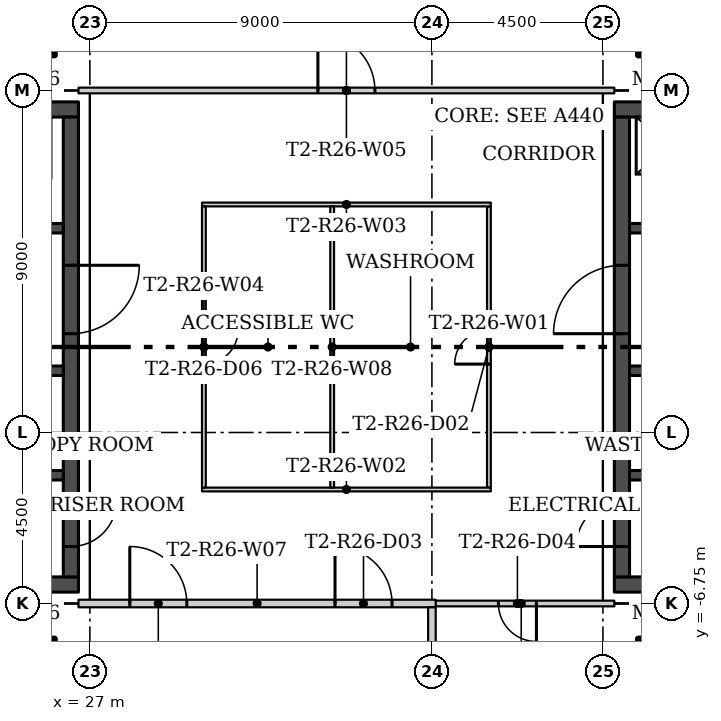
"""IFC4 building model, lengths in metres.
Left out: names, types, materials, properties, quantities, classifications, styles, units other than length and angle.
Written with IfcOpenShell. Run it as: python <this file> out.ifc"""

import sys

from ifc_helpers import new_model, si_unit, direction, frame, frame_2d, origin, origin_2d, place, context, subcontext, project, spatial, rectangle, hollow_rectangle, extrude, element, fill, save


model = new_model("IFC4")
c1 = context("Model", 3, precision=1e-05, world=origin(), true_north=direction((0.0, 1.0)))
c2 = subcontext(c1, "Body", "Model", "MODEL_VIEW")
j1 = project(units=[si_unit("LENGTHUNIT", "METRE"), si_unit("PLANEANGLEUNIT", "RADIAN")], contexts=[c1])
p1 = place(None, origin())
s1 = spatial("IfcSite", under=j1, at=p1, CompositionType="ELEMENT")
p2 = place(p1, origin())
s2 = spatial("IfcBuilding", under=s1, at=p2, CompositionType="ELEMENT")
p3 = place(p2, frame((0.0, 0.0, 242.1)))
s3 = spatial("IfcBuildingStorey", under=s2, at=p3, CompositionType="ELEMENT", Elevation=242.1)
for number, where in (
    (1, (25.625, 8.125, 0.0)),
    (2, (41.875, 8.125, 0.0)),
    (3, (25.625, -8.125, 0.0)),
    (4, (41.875, -8.125, 0.0)),
):
    element("IfcColumn", number, at=place(p3, frame(where)), inside=s3, PredefinedType="COLUMN", context=c2, shape_type="SweptSolid", body=[
        extrude(hollow_rectangle(XDim=0.9, YDim=0.9, WallThickness=0.036, at=origin_2d()), origin(), (0.0, 0.0, 1.0), 3.55),
    ])
p4 = place(p3, frame((37.5, -3.7, 0.0), z_axis=(0.0, 0.0, 1.0), x_axis=(0.0, 1.0, 0.0)))
e5 = element("IfcWall", 5, at=p4, inside=s3, PredefinedType="PARTITIONING", context=c2, shape_type="SweptSolid", body=[
    extrude(rectangle(XDim=7.4, YDim=0.1, at=frame_2d((3.7, 0.0))), origin(), (0.0, 0.0, 1.0), 3.55),
])
p5 = place(p4, frame((3.25, 0.0, 0.0)))
e6 = element("IfcOpeningElement", 6, at=p5, cuts=e5, PredefinedType="OPENING", context=c2, shape_type="SweptSolid", body=[
    extrude(rectangle(XDim=0.9, YDim=2.1, at=frame_2d((0.45, 1.05))), frame((0.0, 0.06, 0.0), z_axis=(0.0, -1.0, 0.0), x_axis=(1.0, 0.0, 0.0)), (0.0, 0.0, 1.0), 0.12),
])
p6 = place(p3, frame((29.95, -3.75, 0.0)))
e7 = element("IfcWall", 7, at=p6, inside=s3, PredefinedType="PARTITIONING", context=c2, shape_type="SweptSolid", body=[
    extrude(rectangle(XDim=7.6, YDim=0.1, at=frame_2d((3.8, 0.0))), origin(), (0.0, 0.0, 1.0), 3.55),
])
p7 = place(p3, frame((37.55, 3.75, 0.0), z_axis=(0.0, 0.0, 1.0), x_axis=(-1.0, 0.0, 0.0)))
e8 = element("IfcWall", 8, at=p7, inside=s3, PredefinedType="PARTITIONING", context=c2, shape_type="SweptSolid", body=[
    extrude(rectangle(XDim=7.6, YDim=0.1, at=frame_2d((3.8, 0.0))), origin(), (0.0, 0.0, 1.0), 3.55),
])
p8 = place(p3, frame((30.0, 3.7, 0.0), z_axis=(0.0, 0.0, 1.0), x_axis=(0.0, -1.0, 0.0)))
e9 = element("IfcWall", 9, at=p8, inside=s3, PredefinedType="PARTITIONING", context=c2, shape_type="SweptSolid", body=[
    extrude(rectangle(XDim=7.4, YDim=0.1, at=frame_2d((3.7, 0.0))), origin(), (0.0, 0.0, 1.0), 3.55),
])
p9 = place(p8, frame((3.25, 0.0, 0.0)))
e10 = element("IfcOpeningElement", 10, at=p9, cuts=e9, PredefinedType="OPENING", context=c2, shape_type="SweptSolid", body=[
    extrude(rectangle(XDim=0.9, YDim=2.1, at=frame_2d((0.45, 1.05))), frame((0.0, 0.06, 0.0), z_axis=(0.0, -1.0, 0.0), x_axis=(1.0, 0.0, 0.0)), (0.0, 0.0, 1.0), 0.12),
])
p10 = place(p3, frame((26.7, 6.75, 0.0)))
e11 = element("IfcWall", 11, at=p10, inside=s3, PredefinedType="PARTITIONING", context=c2, shape_type="SweptSolid", body=[
    extrude(rectangle(XDim=14.1, YDim=0.15, at=frame_2d((7.05, 0.0))), origin(), (0.0, 0.0, 1.0), 3.55),
])
p11 = place(p10, frame((6.3, 0.0, 0.0)))
e12 = element("IfcOpeningElement", 12, at=p11, cuts=e11, PredefinedType="OPENING", context=c2, shape_type="SweptSolid", body=[
    extrude(rectangle(XDim=1.5, YDim=2.1, at=frame_2d((0.75, 1.05))), frame((0.0, 0.085, 0.0), z_axis=(0.0, -1.0, 0.0), x_axis=(1.0, 0.0, 0.0)), (0.0, 0.0, 1.0), 0.17),
])
p12 = place(p3, frame((40.8, -6.75, 0.0), z_axis=(0.0, 0.0, 1.0), x_axis=(-1.0, 0.0, 0.0)))
e13 = element("IfcWall", 13, at=p12, inside=s3, PredefinedType="PARTITIONING", context=c2, shape_type="SweptSolid", body=[
    extrude(rectangle(XDim=4.9, YDim=0.15, at=frame_2d((2.45, 0.0))), origin(), (0.0, 0.0, 1.0), 3.55),
])
p13 = place(p12, frame((2.05, 0.0, 0.0)))
e14 = element("IfcOpeningElement", 14, at=p13, cuts=e13, PredefinedType="OPENING", context=c2, shape_type="SweptSolid", body=[
    extrude(rectangle(XDim=1.0, YDim=2.4, at=frame_2d((0.5, 1.2))), frame((0.0, 0.085, 0.0), z_axis=(0.0, -1.0, 0.0), x_axis=(1.0, 0.0, 0.0)), (0.0, 0.0, 1.0), 0.17),
])
p14 = place(p3, frame((26.7, -6.75, 0.0)))
e15 = element("IfcWall", 15, at=p14, inside=s3, PredefinedType="PARTITIONING", context=c2, shape_type="SweptSolid", body=[
    extrude(rectangle(XDim=9.4, YDim=0.2, at=frame_2d((4.7, 0.0))), origin(), (0.0, 0.0, 1.0), 3.55),
])
p15 = place(p14, frame((6.75, 0.0, 0.0)))
e16 = element("IfcOpeningElement", 16, at=p15, cuts=e15, PredefinedType="OPENING", context=c2, shape_type="SweptSolid", body=[
    extrude(rectangle(XDim=1.5, YDim=2.4, at=frame_2d((0.75, 1.2))), frame((0.0, 0.11, 0.0), z_axis=(0.0, -1.0, 0.0), x_axis=(1.0, 0.0, 0.0)), (0.0, 0.0, 1.0), 0.22),
])
p16 = place(p14, frame((1.35, 0.0, 0.0)))
e17 = element("IfcOpeningElement", 17, at=p16, cuts=e15, PredefinedType="OPENING", context=c2, shape_type="SweptSolid", body=[
    extrude(rectangle(XDim=1.5, YDim=2.4, at=frame_2d((0.75, 1.2))), frame((0.0, 0.11, 0.0), z_axis=(0.0, -1.0, 0.0), x_axis=(1.0, 0.0, 0.0)), (0.0, 0.0, 1.0), 0.22),
])
p17 = place(p3, frame((33.375, 3.7, 0.0), z_axis=(0.0, 0.0, 1.0), x_axis=(0.0, -1.0, 0.0)))
e18 = element("IfcWall", 18, at=p17, inside=s3, PredefinedType="PARTITIONING", context=c2, shape_type="SweptSolid", body=[
    extrude(rectangle(XDim=7.4, YDim=0.1, at=frame_2d((3.7, 0.0))), origin(), (0.0, 0.0, 1.0), 3.55),
])
p18 = place(p3, frame((36.0, -6.85, 0.0), z_axis=(0.0, 0.0, 1.0), x_axis=(0.0, -1.0, 0.0)))
e19 = element("IfcWall", 19, at=p18, inside=s3, PredefinedType="PARTITIONING", context=c2, shape_type="SweptSolid", body=[
    extrude(rectangle(XDim=8.805, YDim=0.2, at=frame_2d((4.402, 0.0))), origin(), (0.0, 0.0, 1.0), 3.55),
])
for number, where in (
    (20, (13.8, -6.25, 0.0)),
    (21, (13.8, 6.25, 0.0)),
):
    element("IfcWall", number, at=place(p3, frame(where)), inside=s3, PredefinedType="SHEAR", context=c2, shape_type="SweptSolid", body=[
        extrude(rectangle(XDim=12.9, YDim=0.4, at=frame_2d((6.45, 0.0))), origin(), (0.0, 0.0, 1.0), 3.55),
    ])
p19 = place(p3, frame((26.5, 6.05, 0.0), z_axis=(0.0, 0.0, 1.0), x_axis=(0.0, -1.0, 0.0)))
e22 = element("IfcWall", 22, at=p19, inside=s3, PredefinedType="SHEAR", context=c2, shape_type="SweptSolid", body=[
    extrude(rectangle(XDim=12.1, YDim=0.4, at=frame_2d((6.05, 0.0))), origin(), (0.0, 0.0, 1.0), 3.55),
])
p20 = place(p19, frame((10.1, 0.0, 0.0)))
e23 = element("IfcOpeningElement", 23, at=p20, cuts=e22, PredefinedType="OPENING", context=c2, shape_type="SweptSolid", body=[
    extrude(rectangle(XDim=1.2, YDim=2.1, at=frame_2d((0.6, 1.05))), frame((0.0, 0.21, 0.0), z_axis=(0.0, -1.0, 0.0), x_axis=(1.0, 0.0, 0.0)), (0.0, 0.0, 1.0), 0.42),
])
p21 = place(p19, frame((3.9, 0.0, 0.0)))
e24 = element("IfcOpeningElement", 24, at=p21, cuts=e22, PredefinedType="OPENING", context=c2, shape_type="SweptSolid", body=[
    extrude(rectangle(XDim=1.8, YDim=2.4, at=frame_2d((0.9, 1.2))), frame((0.0, 0.21, 0.0), z_axis=(0.0, -1.0, 0.0), x_axis=(1.0, 0.0, 0.0)), (0.0, 0.0, 1.0), 0.42),
])
p22 = place(p3, frame((26.3, -3.375, 0.0), z_axis=(0.0, 0.0, 1.0), x_axis=(-1.0, 0.0, 0.0)))
e25 = element("IfcWall", 25, at=p22, inside=s3, PredefinedType="SHEAR", context=c2, shape_type="SweptSolid", body=[
    extrude(rectangle(XDim=12.1, YDim=0.25, at=frame_2d((6.05, 0.0))), origin(), (0.0, 0.0, 1.0), 3.55),
])
p23 = place(p22, frame((10.95, 0.0, 0.0)))
e26 = element("IfcOpeningElement", 26, at=p23, cuts=e25, PredefinedType="OPENING", context=c2, shape_type="SweptSolid", body=[
    extrude(rectangle(XDim=1.1, YDim=2.1, at=frame_2d((0.55, 1.05))), frame((0.0, 0.135, 0.0), z_axis=(0.0, -1.0, 0.0), x_axis=(1.0, 0.0, 0.0)), (0.0, 0.0, 1.0), 0.27),
])
p24 = place(p3, frame((26.3, -0.625, 0.0), z_axis=(0.0, 0.0, 1.0), x_axis=(-1.0, 0.0, 0.0)))
e27 = element("IfcWall", 27, at=p24, inside=s3, PredefinedType="SHEAR", context=c2, shape_type="SweptSolid", body=[
    extrude(rectangle(XDim=12.1, YDim=0.25, at=frame_2d((6.05, 0.0))), origin(), (0.0, 0.0, 1.0), 3.55),
])
p25 = place(p24, frame((8.65, 0.0, 0.0)))
e28 = element("IfcOpeningElement", 28, at=p25, cuts=e27, PredefinedType="OPENING", context=c2, shape_type="SweptSolid", body=[
    extrude(rectangle(XDim=1.2, YDim=2.1, at=frame_2d((0.6, 1.05))), frame((0.0, 0.135, 0.0), z_axis=(0.0, -1.0, 0.0), x_axis=(1.0, 0.0, 0.0)), (0.0, 0.0, 1.0), 0.27),
])
p26 = place(p24, frame((2.15, 0.0, 0.0)))
e29 = element("IfcOpeningElement", 29, at=p26, cuts=e27, PredefinedType="OPENING", context=c2, shape_type="SweptSolid", body=[
    extrude(rectangle(XDim=0.9, YDim=2.1, at=frame_2d((0.45, 1.05))), frame((0.0, 0.135, 0.0), z_axis=(0.0, -1.0, 0.0), x_axis=(1.0, 0.0, 0.0)), (0.0, 0.0, 1.0), 0.27),
])
p27 = place(p24, frame((0.525, 0.0, 0.0)))
e30 = element("IfcOpeningElement", 30, at=p27, cuts=e27, PredefinedType="OPENING", context=c2, shape_type="SweptSolid", body=[
    extrude(rectangle(XDim=0.9, YDim=2.1, at=frame_2d((0.45, 1.05))), frame((0.0, 0.135, 0.0), z_axis=(0.0, -1.0, 0.0), x_axis=(1.0, 0.0, 0.0)), (0.0, 0.0, 1.0), 0.27),
])
p28 = place(p3, frame((14.2, 3.125, 0.0)))
e31 = element("IfcWall", 31, at=p28, inside=s3, PredefinedType="SHEAR", context=c2, shape_type="SweptSolid", body=[
    extrude(rectangle(XDim=12.1, YDim=0.25, at=frame_2d((6.05, 0.0))), origin(), (0.0, 0.0, 1.0), 3.55),
])
p29 = place(p28, frame((6.95, 0.0, 0.0)))
e32 = element("IfcOpeningElement", 32, at=p29, cuts=e31, PredefinedType="OPENING", context=c2, shape_type="SweptSolid", body=[
    extrude(rectangle(XDim=1.1, YDim=2.1, at=frame_2d((0.55, 1.05))), frame((0.0, 0.135, 0.0), z_axis=(0.0, -1.0, 0.0), x_axis=(1.0, 0.0, 0.0)), (0.0, 0.0, 1.0), 0.27),
])
p30 = place(p28, frame((10.075, 0.0, 0.0)))
e33 = element("IfcOpeningElement", 33, at=p30, cuts=e31, PredefinedType="OPENING", context=c2, shape_type="SweptSolid", body=[
    extrude(rectangle(XDim=1.1, YDim=2.1, at=frame_2d((0.55, 1.05))), frame((0.0, 0.135, 0.0), z_axis=(0.0, -1.0, 0.0), x_axis=(1.0, 0.0, 0.0)), (0.0, 0.0, 1.0), 0.27),
])
p31 = place(p28, frame((1.65, 0.0, 0.0)))
e34 = element("IfcOpeningElement", 34, at=p31, cuts=e31, PredefinedType="OPENING", context=c2, shape_type="SweptSolid", body=[
    extrude(rectangle(XDim=0.9, YDim=2.1, at=frame_2d((0.45, 1.05))), frame((0.0, 0.135, 0.0), z_axis=(0.0, -1.0, 0.0), x_axis=(1.0, 0.0, 0.0)), (0.0, 0.0, 1.0), 0.27),
])
p32 = place(p28, frame((4.575, 0.0, 0.0)))
e35 = element("IfcOpeningElement", 35, at=p32, cuts=e31, PredefinedType="OPENING", context=c2, shape_type="SweptSolid", body=[
    extrude(rectangle(XDim=0.9, YDim=2.1, at=frame_2d((0.45, 1.05))), frame((0.0, 0.135, 0.0), z_axis=(0.0, -1.0, 0.0), x_axis=(1.0, 0.0, 0.0)), (0.0, 0.0, 1.0), 0.27),
])
for number, where, z_axis, x_axis in (
    (36, (53.7, -6.25, 0.0), (0.0, 0.0, 1.0), (-1.0, 0.0, 0.0)),
    (37, (53.7, 6.25, 0.0), (0.0, 0.0, 1.0), (-1.0, 0.0, 0.0)),
):
    element("IfcWall", number, at=place(p3, frame(where, z_axis=z_axis, x_axis=x_axis)), inside=s3, PredefinedType="SHEAR", context=c2, shape_type="SweptSolid", body=[
        extrude(rectangle(XDim=12.9, YDim=0.4, at=frame_2d((6.45, 0.0))), origin(), (0.0, 0.0, 1.0), 3.55),
    ])
p33 = place(p3, frame((41.0, -6.05, 0.0), z_axis=(0.0, 0.0, 1.0), x_axis=(0.0, 1.0, 0.0)))
e38 = element("IfcWall", 38, at=p33, inside=s3, PredefinedType="SHEAR", context=c2, shape_type="SweptSolid", body=[
    extrude(rectangle(XDim=12.1, YDim=0.4, at=frame_2d((6.05, 0.0))), origin(), (0.0, 0.0, 1.0), 3.55),
])
p34 = place(p33, frame((0.8, 0.0, 0.0)))
e39 = element("IfcOpeningElement", 39, at=p34, cuts=e38, PredefinedType="OPENING", context=c2, shape_type="SweptSolid", body=[
    extrude(rectangle(XDim=1.2, YDim=2.1, at=frame_2d((0.6, 1.05))), frame((0.0, 0.21, 0.0), z_axis=(0.0, -1.0, 0.0), x_axis=(1.0, 0.0, 0.0)), (0.0, 0.0, 1.0), 0.42),
])
p35 = place(p33, frame((6.4, 0.0, 0.0)))
e40 = element("IfcOpeningElement", 40, at=p35, cuts=e38, PredefinedType="OPENING", context=c2, shape_type="SweptSolid", body=[
    extrude(rectangle(XDim=1.8, YDim=2.4, at=frame_2d((0.9, 1.2))), frame((0.0, 0.21, 0.0), z_axis=(0.0, -1.0, 0.0), x_axis=(1.0, 0.0, 0.0)), (0.0, 0.0, 1.0), 0.42),
])
p36 = place(p3, frame((53.3, -3.375, 0.0), z_axis=(0.0, 0.0, 1.0), x_axis=(-1.0, 0.0, 0.0)))
e41 = element("IfcWall", 41, at=p36, inside=s3, PredefinedType="SHEAR", context=c2, shape_type="SweptSolid", body=[
    extrude(rectangle(XDim=12.1, YDim=0.25, at=frame_2d((6.05, 0.0))), origin(), (0.0, 0.0, 1.0), 3.55),
])
p37 = place(p36, frame((0.05, 0.0, 0.0)))
e42 = element("IfcOpeningElement", 42, at=p37, cuts=e41, PredefinedType="OPENING", context=c2, shape_type="SweptSolid", body=[
    extrude(rectangle(XDim=1.1, YDim=2.1, at=frame_2d((0.55, 1.05))), frame((0.0, 0.135, 0.0), z_axis=(0.0, -1.0, 0.0), x_axis=(1.0, 0.0, 0.0)), (0.0, 0.0, 1.0), 0.27),
])
p38 = place(p3, frame((53.3, -0.625, 0.0), z_axis=(0.0, 0.0, 1.0), x_axis=(-1.0, 0.0, 0.0)))
e43 = element("IfcWall", 43, at=p38, inside=s3, PredefinedType="SHEAR", context=c2, shape_type="SweptSolid", body=[
    extrude(rectangle(XDim=12.1, YDim=0.25, at=frame_2d((6.05, 0.0))), origin(), (0.0, 0.0, 1.0), 3.55),
])
p39 = place(p38, frame((2.25, 0.0, 0.0)))
e44 = element("IfcOpeningElement", 44, at=p39, cuts=e43, PredefinedType="OPENING", context=c2, shape_type="SweptSolid", body=[
    extrude(rectangle(XDim=1.2, YDim=2.1, at=frame_2d((0.6, 1.05))), frame((0.0, 0.135, 0.0), z_axis=(0.0, -1.0, 0.0), x_axis=(1.0, 0.0, 0.0)), (0.0, 0.0, 1.0), 0.27),
])
p40 = place(p38, frame((9.2, 0.0, 0.0)))
e45 = element("IfcOpeningElement", 45, at=p40, cuts=e43, PredefinedType="OPENING", context=c2, shape_type="SweptSolid", body=[
    extrude(rectangle(XDim=0.9, YDim=2.1, at=frame_2d((0.45, 1.05))), frame((0.0, 0.135, 0.0), z_axis=(0.0, -1.0, 0.0), x_axis=(1.0, 0.0, 0.0)), (0.0, 0.0, 1.0), 0.27),
])
p41 = place(p38, frame((10.825, 0.0, 0.0)))
e46 = element("IfcOpeningElement", 46, at=p41, cuts=e43, PredefinedType="OPENING", context=c2, shape_type="SweptSolid", body=[
    extrude(rectangle(XDim=0.9, YDim=2.1, at=frame_2d((0.45, 1.05))), frame((0.0, 0.135, 0.0), z_axis=(0.0, -1.0, 0.0), x_axis=(1.0, 0.0, 0.0)), (0.0, 0.0, 1.0), 0.27),
])
p42 = place(p3, frame((41.2, 3.125, 0.0)))
e47 = element("IfcWall", 47, at=p42, inside=s3, PredefinedType="SHEAR", context=c2, shape_type="SweptSolid", body=[
    extrude(rectangle(XDim=4.8, YDim=0.25, at=frame_2d((2.4, 0.0))), origin(), (0.0, 0.0, 1.0), 3.55),
])
p43 = place(p42, frame((0.525, 0.0, 0.0)))
e48 = element("IfcOpeningElement", 48, at=p43, cuts=e47, PredefinedType="OPENING", context=c2, shape_type="SweptSolid", body=[
    extrude(rectangle(XDim=1.1, YDim=2.1, at=frame_2d((0.55, 1.05))), frame((0.0, 0.135, 0.0), z_axis=(0.0, -1.0, 0.0), x_axis=(1.0, 0.0, 0.0)), (0.0, 0.0, 1.0), 0.27),
])
p44 = place(p42, frame((3.025, 0.0, 0.0)))
e49 = element("IfcOpeningElement", 49, at=p44, cuts=e47, PredefinedType="OPENING", context=c2, shape_type="SweptSolid", body=[
    extrude(rectangle(XDim=0.9, YDim=2.1, at=frame_2d((0.45, 1.05))), frame((0.0, 0.135, 0.0), z_axis=(0.0, -1.0, 0.0), x_axis=(1.0, 0.0, 0.0)), (0.0, 0.0, 1.0), 0.27),
])
p45 = place(p11, origin())
e50 = element("IfcDoor", 50, at=p45, inside=s3, OperationType="DOUBLE_DOOR_SINGLE_SWING", PredefinedType="DOOR", context=c2, shape_type="SweptSolid", body=[
    extrude(rectangle(XDim=1.5, YDim=2.1, at=frame_2d((0.75, 1.05))), frame((0.0, 0.025, 0.0), z_axis=(0.0, -1.0, 0.0), x_axis=(1.0, 0.0, 0.0)), (0.0, 0.0, 1.0), 0.05),
])
fill(e12, e50)
p46 = place(p5, origin())
e51 = element("IfcDoor", 51, at=p46, inside=s3, OperationType="SINGLE_SWING_LEFT", PredefinedType="DOOR", context=c2, shape_type="SweptSolid", body=[
    extrude(rectangle(XDim=0.9, YDim=2.1, at=frame_2d((0.45, 1.05))), frame((0.0, 0.025, 0.0), z_axis=(0.0, -1.0, 0.0), x_axis=(1.0, 0.0, 0.0)), (0.0, 0.0, 1.0), 0.05),
])
fill(e6, e51)
p47 = place(p15, origin())
e52 = element("IfcDoor", 52, at=p47, inside=s3, OperationType="DOUBLE_DOOR_SINGLE_SWING", PredefinedType="DOOR", context=c2, shape_type="SweptSolid", body=[
    extrude(rectangle(XDim=1.5, YDim=2.4, at=frame_2d((0.75, 1.2))), frame((0.0, 0.025, 0.0), z_axis=(0.0, -1.0, 0.0), x_axis=(1.0, 0.0, 0.0)), (0.0, 0.0, 1.0), 0.05),
])
fill(e16, e52)
p48 = place(p13, origin())
e53 = element("IfcDoor", 53, at=p48, inside=s3, OperationType="SINGLE_SWING_RIGHT", PredefinedType="DOOR", context=c2, shape_type="SweptSolid", body=[
    extrude(rectangle(XDim=1.0, YDim=2.4, at=frame_2d((0.5, 1.2))), frame((0.0, 0.025, 0.0), z_axis=(0.0, -1.0, 0.0), x_axis=(1.0, 0.0, 0.0)), (0.0, 0.0, 1.0), 0.05),
])
fill(e14, e53)
p49 = place(p16, origin())
e54 = element("IfcDoor", 54, at=p49, inside=s3, OperationType="DOUBLE_DOOR_SINGLE_SWING", PredefinedType="DOOR", context=c2, shape_type="SweptSolid", body=[
    extrude(rectangle(XDim=1.5, YDim=2.4, at=frame_2d((0.75, 1.2))), frame((0.0, 0.025, 0.0), z_axis=(0.0, -1.0, 0.0), x_axis=(1.0, 0.0, 0.0)), (0.0, 0.0, 1.0), 0.05),
])
fill(e17, e54)
p50 = place(p9, origin())
e55 = element("IfcDoor", 55, at=p50, inside=s3, OperationType="SINGLE_SWING_RIGHT", PredefinedType="DOOR", context=c2, shape_type="SweptSolid", body=[
    extrude(rectangle(XDim=0.9, YDim=2.1, at=frame_2d((0.45, 1.05))), frame((0.0, 0.025, 0.0), z_axis=(0.0, -1.0, 0.0), x_axis=(1.0, 0.0, 0.0)), (0.0, 0.0, 1.0), 0.05),
])
fill(e10, e55)
p51 = place(p20, origin())
e56 = element("IfcDoor", 56, at=p51, inside=s3, OperationType="SINGLE_SWING_RIGHT", PredefinedType="DOOR", context=c2, shape_type="SweptSolid", body=[
    extrude(rectangle(XDim=1.2, YDim=2.1, at=frame_2d((0.6, 1.05))), frame((0.0, 0.025, 0.0), z_axis=(0.0, -1.0, 0.0), x_axis=(1.0, 0.0, 0.0)), (0.0, 0.0, 1.0), 0.05),
])
fill(e23, e56)
p52 = place(p21, origin())
e57 = element("IfcDoor", 57, at=p52, inside=s3, OperationType="DOUBLE_DOOR_SINGLE_SWING", PredefinedType="DOOR", context=c2, shape_type="SweptSolid", body=[
    extrude(rectangle(XDim=1.8, YDim=2.4, at=frame_2d((0.9, 1.2))), frame((0.0, 0.025, 0.0), z_axis=(0.0, -1.0, 0.0), x_axis=(1.0, 0.0, 0.0)), (0.0, 0.0, 1.0), 0.05),
])
fill(e24, e57)
p53 = place(p34, origin())
e58 = element("IfcDoor", 58, at=p53, inside=s3, OperationType="SINGLE_SWING_LEFT", PredefinedType="DOOR", context=c2, shape_type="SweptSolid", body=[
    extrude(rectangle(XDim=1.2, YDim=2.1, at=frame_2d((0.6, 1.05))), frame((0.0, 0.025, 0.0), z_axis=(0.0, -1.0, 0.0), x_axis=(1.0, 0.0, 0.0)), (0.0, 0.0, 1.0), 0.05),
])
fill(e39, e58)
p54 = place(p35, origin())
e59 = element("IfcDoor", 59, at=p54, inside=s3, OperationType="DOUBLE_DOOR_SINGLE_SWING", PredefinedType="DOOR", context=c2, shape_type="SweptSolid", body=[
    extrude(rectangle(XDim=1.8, YDim=2.4, at=frame_2d((0.9, 1.2))), frame((0.0, 0.025, 0.0), z_axis=(0.0, -1.0, 0.0), x_axis=(1.0, 0.0, 0.0)), (0.0, 0.0, 1.0), 0.05),
])
fill(e40, e59)
save(model, sys.argv[1])
